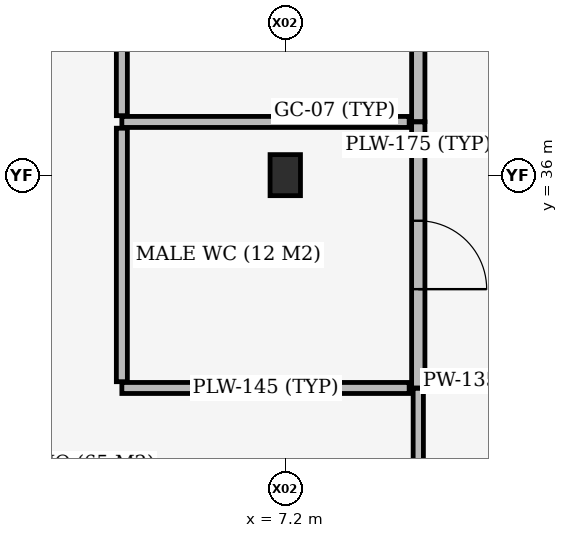
"""IFC4 building model, lengths in metres.
Left out: names, types, materials, properties, quantities, classifications, styles, units other than length and angle.
Written with IfcOpenShell. Run it as: python <this file> out.ifc"""

import sys

from ifc_helpers import new_model, si_unit, direction, frame, frame_2d, origin, origin_2d, place, context, subcontext, project, spatial, rectangle, extrude, element, fill, save


model = new_model("IFC4")
c1 = context("Model", 3, precision=1e-05, world=origin(), true_north=direction((0.0, 1.0)))
c2 = subcontext(c1, "Body", "Model", "MODEL_VIEW")
j1 = project(units=[si_unit("LENGTHUNIT", "METRE"), si_unit("PLANEANGLEUNIT", "RADIAN")], contexts=[c1])
p1 = place(None, origin())
s1 = spatial("IfcSite", under=j1, at=p1, CompositionType="ELEMENT")
p2 = place(p1, origin())
s2 = spatial("IfcBuilding", under=s1, at=p2, CompositionType="ELEMENT")
p3 = place(p2, frame((0.0, 0.0, 18.0)))
s3 = spatial("IfcBuildingStorey", under=s2, at=p3, CompositionType="ELEMENT", Elevation=18.0)
p4 = place(p3, frame((7.2, 36.0, 0.0), z_axis=(0.0, 0.0, 1.0), x_axis=(1.0, 0.0, 0.0)))
e1 = element("IfcColumn", 1, at=p4, inside=s3, PredefinedType="COLUMN", context=c2, shape_type="SweptSolid", body=[
    extrude(rectangle(XDim=0.4, YDim=0.54, at=origin_2d()), origin(), (0.0, 0.0, 1.0), 3.935),
])
p5 = place(p3, frame((8.95, 33.2, 0.0), z_axis=(0.0, 0.0, 1.0), x_axis=(0.0, 1.0, 0.0)))
e2 = element("IfcWall", 2, at=p5, inside=s3, PredefinedType="PLUMBINGWALL", context=c2, shape_type="SweptSolid", body=[
    extrude(rectangle(XDim=3.5, YDim=0.175, at=frame_2d((1.75, 0.0))), origin(), (0.0, 0.0, 1.0), 3.255),
])
p6 = place(p5, frame((1.3, 0.0, 0.0)))
e3 = element("IfcOpeningElement", 3, at=p6, cuts=e2, PredefinedType="OPENING", context=c2, shape_type="SweptSolid", body=[
    extrude(rectangle(XDim=0.9, YDim=2.1, at=frame_2d((0.45, 1.05))), frame((0.0, 0.097, 0.0), z_axis=(0.0, -1.0, 0.0), x_axis=(1.0, 0.0, 0.0)), (0.0, 0.0, 1.0), 0.195),
])
p7 = place(p3, frame((5.05, 33.2, 0.0), z_axis=(0.0, 0.0, 1.0), x_axis=(1.0, 0.0, 0.0)))
e4 = element("IfcWall", 4, at=p7, inside=s3, PredefinedType="PLUMBINGWALL", context=c2, shape_type="SweptSolid", body=[
    extrude(rectangle(XDim=3.78, YDim=0.145, at=frame_2d((1.89, 0.0))), origin(), (0.0, 0.0, 1.0), 3.415),
])
p8 = place(p3, frame((5.05, 36.7, 0.0), z_axis=(0.0, 0.0, 1.0), x_axis=(1.0, 0.0, 0.0)))
e5 = element("IfcWall", 5, at=p8, inside=s3, PredefinedType="PLUMBINGWALL", context=c2, shape_type="SweptSolid", body=[
    extrude(rectangle(XDim=3.78, YDim=0.145, at=frame_2d((1.89, 0.0))), origin(), (0.0, 0.0, 1.0), 3.355),
])
p9 = place(p3, frame((5.05, 33.282, 0.0), z_axis=(0.0, 0.0, 1.0), x_axis=(0.0, 1.0, 0.0)))
e6 = element("IfcWall", 6, at=p9, inside=s3, PredefinedType="PLUMBINGWALL", context=c2, shape_type="SweptSolid", body=[
    extrude(rectangle(XDim=3.335, YDim=0.145, at=frame_2d((1.667, 0.0))), origin(), (0.0, 0.0, 1.0), 3.295),
])
p10 = place(p3, frame((8.95, 36.705, 0.0), z_axis=(0.0, 0.0, 1.0), x_axis=(0.0, 1.0, 0.0)))
e7 = element("IfcWall", 7, at=p10, inside=s3, PredefinedType="PLUMBINGWALL", context=c2, shape_type="SweptSolid", body=[
    extrude(rectangle(XDim=3.495, YDim=0.175, at=frame_2d((1.748, 0.0))), origin(), (0.0, 0.0, 1.0), 3.935),
])
p11 = place(p10, frame((1.298, 0.0, 0.0)))
e8 = element("IfcOpeningElement", 8, at=p11, cuts=e7, PredefinedType="OPENING", context=c2, shape_type="SweptSolid", body=[
    extrude(rectangle(XDim=0.9, YDim=2.1, at=frame_2d((0.45, 1.05))), frame((0.0, 0.097, 0.0), z_axis=(0.0, -1.0, 0.0), x_axis=(1.0, 0.0, 0.0)), (0.0, 0.0, 1.0), 0.195),
])
p12 = place(p3, frame((5.05, 36.782, 0.0), z_axis=(0.0, 0.0, 1.0), x_axis=(0.0, 1.0, 0.0)))
e9 = element("IfcWall", 9, at=p12, inside=s3, PredefinedType="PLUMBINGWALL", context=c2, shape_type="SweptSolid", body=[
    extrude(rectangle(XDim=3.335, YDim=0.145, at=frame_2d((1.667, 0.0))), origin(), (0.0, 0.0, 1.0), 3.935),
])
p13 = place(p3, frame((8.95, 30.105, 0.0), z_axis=(0.0, 0.0, 1.0), x_axis=(0.0, 1.0, 0.0)))
e10 = element("IfcWall", 10, at=p13, inside=s3, PredefinedType="PARTITIONING", context=c2, shape_type="SweptSolid", body=[
    extrude(rectangle(XDim=3.09, YDim=0.135, at=frame_2d((1.545, 0.0))), origin(), (0.0, 0.0, 1.0), 3.935),
])
p14 = place(p13, frame((0.965, 0.0, 0.0)))
e11 = element("IfcOpeningElement", 11, at=p14, cuts=e10, PredefinedType="OPENING", context=c2, shape_type="SweptSolid", body=[
    extrude(rectangle(XDim=1.16, YDim=2.2, at=frame_2d((0.58, 1.1))), frame((0.0, 0.077, 0.0), z_axis=(0.0, -1.0, 0.0), x_axis=(1.0, 0.0, 0.0)), (0.0, 0.0, 1.0), 0.155),
])
p15 = place(p6, origin())
e12 = element("IfcDoor", 12, at=p15, inside=s3, OperationType="SINGLE_SWING_RIGHT", PredefinedType="DOOR", context=c2, shape_type="SweptSolid", body=[
    extrude(rectangle(XDim=0.9, YDim=2.1, at=frame_2d((0.45, 1.05))), frame((0.0, 0.025, 0.0), z_axis=(0.0, -1.0, 0.0), x_axis=(1.0, 0.0, 0.0)), (0.0, 0.0, 1.0), 0.05),
])
fill(e3, e12)
save(model, sys.argv[1])
